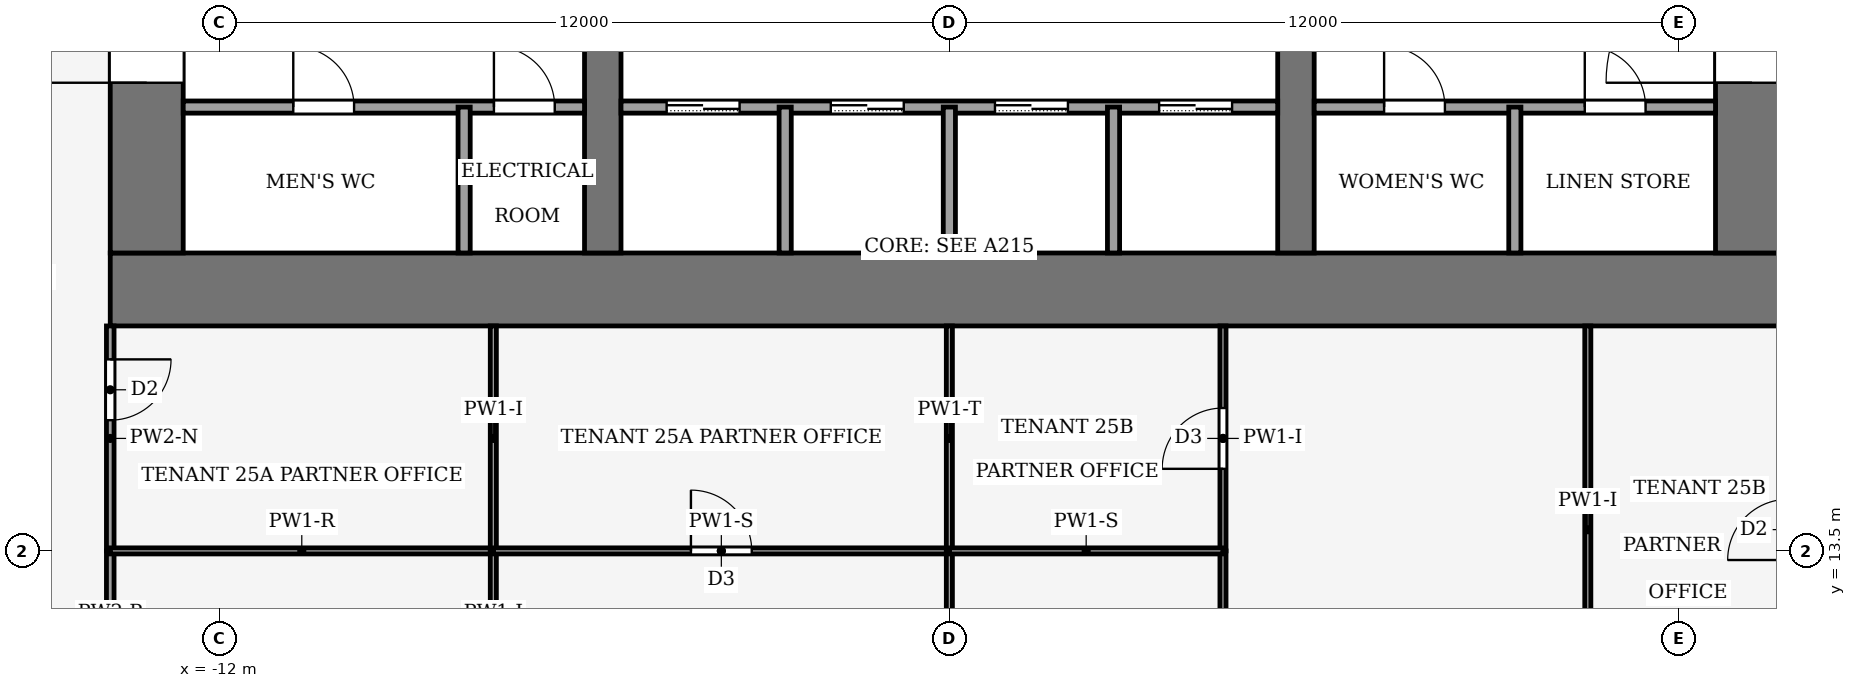
"""IFC4 building model, lengths in metres.
Left out: names, types, materials, properties, quantities, classifications, styles, units other than length and angle.
Written with IfcOpenShell. Run it as: python <this file> out.ifc"""

import sys

from ifc_helpers import new_model, si_unit, direction, frame, frame_2d, origin, place, context, subcontext, project, spatial, rectangle, extrude, element, fill, save


model = new_model("IFC4")
c1 = context("Model", 3, precision=1e-05, world=origin(), true_north=direction((0.0, 1.0)))
c2 = subcontext(c1, "Body", "Model", "MODEL_VIEW")
j1 = project(units=[si_unit("LENGTHUNIT", "METRE"), si_unit("PLANEANGLEUNIT", "RADIAN")], contexts=[c1])
p1 = place(None, origin())
s1 = spatial("IfcSite", under=j1, at=p1, CompositionType="ELEMENT")
p2 = place(p1, origin())
s2 = spatial("IfcBuilding", under=s1, at=p2, CompositionType="ELEMENT")
p3 = place(p2, frame((0.0, 0.0, 110.0)))
s3 = spatial("IfcBuildingStorey", under=s2, at=p3, CompositionType="ELEMENT", Elevation=110.0)
p4 = place(p3, frame((-13.8, 17.8, -0.13), z_axis=(0.0, 0.0, 1.0), x_axis=(1.0, 0.0, 0.0)))
e1 = element("IfcWall", 1, at=p4, inside=s3, PredefinedType="SHEAR", context=c2, shape_type="SweptSolid", body=[
    extrude(rectangle(XDim=27.6, YDim=1.2, at=frame_2d((13.8, 0.0))), origin(), (0.0, 0.0, 1.0), 3.88),
])
p5 = place(p3, frame((-13.2, 18.4, -0.13), z_axis=(0.0, 0.0, 1.0), x_axis=(0.0, 1.0, 0.0)))
e2 = element("IfcWall", 2, at=p5, inside=s3, PredefinedType="SHEAR", context=c2, shape_type="SweptSolid", body=[
    extrude(rectangle(XDim=19.2, YDim=1.2, at=frame_2d((9.6, 0.0))), origin(), (0.0, 0.0, 1.0), 3.88),
])
p6 = place(p5, frame((2.8, 0.0, 0.13)))
e3 = element("IfcOpeningElement", 3, at=p6, cuts=e2, PredefinedType="OPENING", context=c2, shape_type="SweptSolid", body=[
    extrude(rectangle(XDim=2.4, YDim=2.4, at=frame_2d((1.2, 1.2))), frame((0.0, 0.61, 0.0), z_axis=(0.0, -1.0, 0.0), x_axis=(1.0, 0.0, 0.0)), (0.0, 0.0, 1.0), 1.22),
])
p7 = place(p5, frame((13.4, 0.0, 0.13)))
e4 = element("IfcOpeningElement", 4, at=p7, cuts=e2, PredefinedType="OPENING", context=c2, shape_type="SweptSolid", body=[
    extrude(rectangle(XDim=1.4, YDim=2.2, at=frame_2d((0.7, 1.1))), frame((0.0, 0.61, 0.0), z_axis=(0.0, -1.0, 0.0), x_axis=(1.0, 0.0, 0.0)), (0.0, 0.0, 1.0), 1.22),
])
p8 = place(p3, frame((13.2, 18.4, -0.13), z_axis=(0.0, 0.0, 1.0), x_axis=(0.0, 1.0, 0.0)))
e5 = element("IfcWall", 5, at=p8, inside=s3, PredefinedType="SHEAR", context=c2, shape_type="SweptSolid", body=[
    extrude(rectangle(XDim=19.2, YDim=1.2, at=frame_2d((9.6, 0.0))), origin(), (0.0, 0.0, 1.0), 3.88),
])
p9 = place(p8, frame((2.8, 0.0, 0.13)))
e6 = element("IfcOpeningElement", 6, at=p9, cuts=e5, PredefinedType="OPENING", context=c2, shape_type="SweptSolid", body=[
    extrude(rectangle(XDim=2.4, YDim=2.4, at=frame_2d((1.2, 1.2))), frame((0.0, 0.61, 0.0), z_axis=(0.0, -1.0, 0.0), x_axis=(1.0, 0.0, 0.0)), (0.0, 0.0, 1.0), 1.22),
])
p10 = place(p8, frame((13.3, 0.0, 0.13)))
e7 = element("IfcOpeningElement", 7, at=p10, cuts=e5, PredefinedType="OPENING", context=c2, shape_type="SweptSolid", body=[
    extrude(rectangle(XDim=2.4, YDim=2.4, at=frame_2d((1.2, 1.2))), frame((0.0, 0.61, 0.0), z_axis=(0.0, -1.0, 0.0), x_axis=(1.0, 0.0, 0.0)), (0.0, 0.0, 1.0), 1.22),
])
p11 = place(p3, frame((-5.7, 18.4, -0.13), z_axis=(0.0, 0.0, 1.0), x_axis=(0.0, 1.0, 0.0)))
e8 = element("IfcWall", 8, at=p11, inside=s3, PredefinedType="SHEAR", context=c2, shape_type="SweptSolid", body=[
    extrude(rectangle(XDim=19.2, YDim=0.6, at=frame_2d((9.6, 0.0))), origin(), (0.0, 0.0, 1.0), 3.88),
])
p12 = place(p11, frame((8.35, 0.0, 0.13)))
e9 = element("IfcOpeningElement", 9, at=p12, cuts=e8, PredefinedType="OPENING", context=c2, shape_type="SweptSolid", body=[
    extrude(rectangle(XDim=0.9, YDim=2.1, at=frame_2d((0.45, 1.05))), frame((0.0, 0.31, 0.0), z_axis=(0.0, -1.0, 0.0), x_axis=(1.0, 0.0, 0.0)), (0.0, 0.0, 1.0), 0.62),
])
p13 = place(p3, frame((5.7, 18.4, -0.13), z_axis=(0.0, 0.0, 1.0), x_axis=(0.0, 1.0, 0.0)))
e10 = element("IfcWall", 10, at=p13, inside=s3, PredefinedType="SHEAR", context=c2, shape_type="SweptSolid", body=[
    extrude(rectangle(XDim=19.2, YDim=0.6, at=frame_2d((9.6, 0.0))), origin(), (0.0, 0.0, 1.0), 3.88),
])
p14 = place(p13, frame((8.35, 0.0, 0.13)))
e11 = element("IfcOpeningElement", 11, at=p14, cuts=e10, PredefinedType="OPENING", context=c2, shape_type="SweptSolid", body=[
    extrude(rectangle(XDim=0.9, YDim=2.1, at=frame_2d((0.45, 1.05))), frame((0.0, 0.31, 0.0), z_axis=(0.0, -1.0, 0.0), x_axis=(1.0, 0.0, 0.0)), (0.0, 0.0, 1.0), 0.62),
])
p15 = place(p13, frame((13.3, 0.0, 0.13)))
e12 = element("IfcOpeningElement", 12, at=p15, cuts=e10, PredefinedType="OPENING", context=c2, shape_type="SweptSolid", body=[
    extrude(rectangle(XDim=2.4, YDim=2.4, at=frame_2d((1.2, 1.2))), frame((0.0, 0.31, 0.0), z_axis=(0.0, -1.0, 0.0), x_axis=(1.0, 0.0, 0.0)), (0.0, 0.0, 1.0), 0.62),
])
p16 = place(p3, frame((-12.6, 20.8, 0.0), z_axis=(0.0, 0.0, 1.0), x_axis=(1.0, 0.0, 0.0)))
e13 = element("IfcWall", 13, at=p16, inside=s3, PredefinedType="PARTITIONING", context=c2, shape_type="SweptSolid", body=[
    extrude(rectangle(XDim=6.6, YDim=0.2, at=frame_2d((3.3, 0.0))), origin(), (0.0, 0.0, 1.0), 3.75),
])
p17 = place(p16, frame((1.81, 0.0, 0.0)))
e14 = element("IfcOpeningElement", 14, at=p17, cuts=e13, PredefinedType="OPENING", context=c2, shape_type="SweptSolid", body=[
    extrude(rectangle(XDim=1.0, YDim=2.1, at=frame_2d((0.5, 1.05))), frame((0.0, 0.11, 0.0), z_axis=(0.0, -1.0, 0.0), x_axis=(1.0, 0.0, 0.0)), (0.0, 0.0, 1.0), 0.22),
])
p18 = place(p16, frame((5.11, 0.0, 0.0)))
e15 = element("IfcOpeningElement", 15, at=p18, cuts=e13, PredefinedType="OPENING", context=c2, shape_type="SweptSolid", body=[
    extrude(rectangle(XDim=1.0, YDim=2.1, at=frame_2d((0.5, 1.05))), frame((0.0, 0.11, 0.0), z_axis=(0.0, -1.0, 0.0), x_axis=(1.0, 0.0, 0.0)), (0.0, 0.0, 1.0), 0.22),
])
p19 = place(p3, frame((-5.4, 20.8, 0.0), z_axis=(0.0, 0.0, 1.0), x_axis=(1.0, 0.0, 0.0)))
e16 = element("IfcWall", 16, at=p19, inside=s3, PredefinedType="PARTITIONING", context=c2, shape_type="SweptSolid", body=[
    extrude(rectangle(XDim=10.8, YDim=0.2, at=frame_2d((5.4, 0.0))), origin(), (0.0, 0.0, 1.0), 3.75),
])
p20 = place(p19, frame((0.75, 0.0, 0.0)))
e17 = element("IfcOpeningElement", 17, at=p20, cuts=e16, PredefinedType="OPENING", context=c2, shape_type="SweptSolid", body=[
    extrude(rectangle(XDim=1.2, YDim=2.2, at=frame_2d((0.6, 1.1))), frame((0.0, 0.11, 0.0), z_axis=(0.0, -1.0, 0.0), x_axis=(1.0, 0.0, 0.0)), (0.0, 0.0, 1.0), 0.22),
])
p21 = place(p19, frame((3.45, 0.0, 0.0)))
e18 = element("IfcOpeningElement", 18, at=p21, cuts=e16, PredefinedType="OPENING", context=c2, shape_type="SweptSolid", body=[
    extrude(rectangle(XDim=1.2, YDim=2.2, at=frame_2d((0.6, 1.1))), frame((0.0, 0.11, 0.0), z_axis=(0.0, -1.0, 0.0), x_axis=(1.0, 0.0, 0.0)), (0.0, 0.0, 1.0), 0.22),
])
p22 = place(p19, frame((6.15, 0.0, 0.0)))
e19 = element("IfcOpeningElement", 19, at=p22, cuts=e16, PredefinedType="OPENING", context=c2, shape_type="SweptSolid", body=[
    extrude(rectangle(XDim=1.2, YDim=2.2, at=frame_2d((0.6, 1.1))), frame((0.0, 0.11, 0.0), z_axis=(0.0, -1.0, 0.0), x_axis=(1.0, 0.0, 0.0)), (0.0, 0.0, 1.0), 0.22),
])
p23 = place(p19, frame((8.85, 0.0, 0.0)))
e20 = element("IfcOpeningElement", 20, at=p23, cuts=e16, PredefinedType="OPENING", context=c2, shape_type="SweptSolid", body=[
    extrude(rectangle(XDim=1.2, YDim=2.2, at=frame_2d((0.6, 1.1))), frame((0.0, 0.11, 0.0), z_axis=(0.0, -1.0, 0.0), x_axis=(1.0, 0.0, 0.0)), (0.0, 0.0, 1.0), 0.22),
])
p24 = place(p3, frame((6.0, 20.8, 0.0), z_axis=(0.0, 0.0, 1.0), x_axis=(1.0, 0.0, 0.0)))
e21 = element("IfcWall", 21, at=p24, inside=s3, PredefinedType="PARTITIONING", context=c2, shape_type="SweptSolid", body=[
    extrude(rectangle(XDim=6.6, YDim=0.2, at=frame_2d((3.3, 0.0))), origin(), (0.0, 0.0, 1.0), 3.75),
])
p25 = place(p24, frame((1.15, 0.0, 0.0)))
e22 = element("IfcOpeningElement", 22, at=p25, cuts=e21, PredefinedType="OPENING", context=c2, shape_type="SweptSolid", body=[
    extrude(rectangle(XDim=1.0, YDim=2.1, at=frame_2d((0.5, 1.05))), frame((0.0, 0.11, 0.0), z_axis=(0.0, -1.0, 0.0), x_axis=(1.0, 0.0, 0.0)), (0.0, 0.0, 1.0), 0.22),
])
p26 = place(p24, frame((4.45, 0.0, 0.0)))
e23 = element("IfcOpeningElement", 23, at=p26, cuts=e21, PredefinedType="OPENING", context=c2, shape_type="SweptSolid", body=[
    extrude(rectangle(XDim=1.0, YDim=2.1, at=frame_2d((0.5, 1.05))), frame((0.0, 0.11, 0.0), z_axis=(0.0, -1.0, 0.0), x_axis=(1.0, 0.0, 0.0)), (0.0, 0.0, 1.0), 0.22),
])
for number, where, z_axis, x_axis in (
    (24, (-7.98, 18.4, 0.0), (0.0, 0.0, 1.0), (0.0, 1.0, 0.0)),
    (25, (-2.7, 18.4, 0.0), (0.0, 0.0, 1.0), (0.0, 1.0, 0.0)),
    (26, (0.0, 18.4, 0.0), (0.0, 0.0, 1.0), (0.0, 1.0, 0.0)),
    (27, (2.7, 18.4, 0.0), (0.0, 0.0, 1.0), (0.0, 1.0, 0.0)),
    (28, (9.3, 18.4, 0.0), (0.0, 0.0, 1.0), (0.0, 1.0, 0.0)),
):
    element("IfcWall", number, at=place(p3, frame(where, z_axis=z_axis, x_axis=x_axis)), inside=s3, PredefinedType="PARTITIONING", context=c2, shape_type="SweptSolid", body=[
        extrude(rectangle(XDim=2.4, YDim=0.2, at=frame_2d((1.2, 0.0))), origin(), (0.0, 0.0, 1.0), 3.75),
    ])
p27 = place(p3, frame((-13.8, 10.5, 0.0), z_axis=(0.0, 0.0, 1.0), x_axis=(0.0, 1.0, 0.0)))
e29 = element("IfcWall", 29, at=p27, inside=s3, PredefinedType="PARTITIONING", context=c2, shape_type="SweptSolid", body=[
    extrude(rectangle(XDim=3.0, YDim=0.125, at=frame_2d((1.5, 0.0))), origin(), (0.0, 0.0, 1.0), 3.75),
])
p28 = place(p3, frame((-13.8, 17.2, 0.0), z_axis=(0.0, 0.0, 1.0), x_axis=(0.0, -1.0, 0.0)))
e30 = element("IfcWall", 30, at=p28, inside=s3, PredefinedType="PARTITIONING", context=c2, shape_type="SweptSolid", body=[
    extrude(rectangle(XDim=3.7, YDim=0.125, at=frame_2d((1.85, 0.0))), origin(), (0.0, 0.0, 1.0), 3.02),
])
p29 = place(p28, frame((0.55, 0.0, 0.0)))
e31 = element("IfcOpeningElement", 31, at=p29, cuts=e30, PredefinedType="OPENING", context=c2, shape_type="SweptSolid", body=[
    extrude(rectangle(XDim=1.0, YDim=2.1, at=frame_2d((0.5, 1.05))), frame((0.0, 0.073, 0.0), z_axis=(0.0, -1.0, 0.0), x_axis=(1.0, 0.0, 0.0)), (0.0, 0.0, 1.0), 0.145),
])
p30 = place(p3, frame((-7.5, 13.5, 0.0), z_axis=(0.0, 0.0, 1.0), x_axis=(-1.0, 0.0, 0.0)))
e32 = element("IfcWall", 32, at=p30, inside=s3, PredefinedType="PARTITIONING", context=c2, shape_type="SweptSolid", body=[
    extrude(rectangle(XDim=6.3, YDim=0.1, at=frame_2d((3.15, 0.0))), origin(), (0.0, 0.0, 1.0), 3.27),
])
p31 = place(p3, frame((-7.5, 10.496, 0.0), z_axis=(0.0, 0.0, 1.0), x_axis=(0.0, 1.0, 0.0)))
e33 = element("IfcWall", 33, at=p31, inside=s3, PredefinedType="PARTITIONING", context=c2, shape_type="SweptSolid", body=[
    extrude(rectangle(XDim=3.004, YDim=0.1, at=frame_2d((1.502, 0.0))), origin(), (0.0, 0.0, 1.0), 3.75),
])
p32 = place(p3, frame((-7.5, 13.5, 0.0), z_axis=(0.0, 0.0, 1.0), x_axis=(0.0, 1.0, 0.0)))
e34 = element("IfcWall", 34, at=p32, inside=s3, PredefinedType="PARTITIONING", context=c2, shape_type="SweptSolid", body=[
    extrude(rectangle(XDim=3.7, YDim=0.1, at=frame_2d((1.85, 0.0))), origin(), (0.0, 0.0, 1.0), 3.75),
])
p33 = place(p3, frame((-7.5, 13.5, 0.0), z_axis=(0.0, 0.0, 1.0), x_axis=(1.0, 0.0, 0.0)))
e35 = element("IfcWall", 35, at=p33, inside=s3, PredefinedType="PARTITIONING", context=c2, shape_type="SweptSolid", body=[
    extrude(rectangle(XDim=7.5, YDim=0.1, at=frame_2d((3.75, 0.0))), origin(), (0.0, 0.0, 1.0), 3.32),
])
p34 = place(p33, frame((3.25, 0.0, 0.0)))
e36 = element("IfcOpeningElement", 36, at=p34, cuts=e35, PredefinedType="OPENING", context=c2, shape_type="SweptSolid", body=[
    extrude(rectangle(XDim=1.0, YDim=2.1, at=frame_2d((0.5, 1.05))), frame((0.0, 0.06, 0.0), z_axis=(0.0, -1.0, 0.0), x_axis=(1.0, 0.0, 0.0)), (0.0, 0.0, 1.0), 0.12),
])
p35 = place(p3, frame((0.0, 5.92, 0.0), z_axis=(0.0, 0.0, 1.0), x_axis=(0.0, 1.0, 0.0)))
e37 = element("IfcWall", 37, at=p35, inside=s3, PredefinedType="PARTITIONING", context=c2, shape_type="SweptSolid", body=[
    extrude(rectangle(XDim=7.58, YDim=0.1, at=frame_2d((3.79, 0.0))), origin(), (0.0, 0.0, 1.0), 2.92),
])
p36 = place(p3, frame((0.0, 13.5, 0.0), z_axis=(0.0, 0.0, 1.0), x_axis=(0.0, 1.0, 0.0)))
e38 = element("IfcWall", 38, at=p36, inside=s3, PredefinedType="PARTITIONING", context=c2, shape_type="SweptSolid", body=[
    extrude(rectangle(XDim=3.7, YDim=0.1, at=frame_2d((1.85, 0.0))), origin(), (0.0, 0.0, 1.0), 3.36),
])
p37 = place(p3, frame((10.5, 17.2, 0.0), z_axis=(0.0, 0.0, 1.0), x_axis=(0.0, -1.0, 0.0)))
e39 = element("IfcWall", 39, at=p37, inside=s3, PredefinedType="PARTITIONING", context=c2, shape_type="SweptSolid", body=[
    extrude(rectangle(XDim=6.704, YDim=0.1, at=frame_2d((3.352, 0.0))), origin(), (0.0, 0.0, 1.0), 3.75),
])
p38 = place(p3, frame((4.5, 5.545, 0.0), z_axis=(0.0, 0.0, 1.0), x_axis=(0.0, 1.0, 0.0)))
e40 = element("IfcWall", 40, at=p38, inside=s3, PredefinedType="PARTITIONING", context=c2, shape_type="SweptSolid", body=[
    extrude(rectangle(XDim=7.955, YDim=0.1, at=frame_2d((3.978, 0.0))), origin(), (0.0, 0.0, 1.0), 2.92),
])
p39 = place(p38, frame((3.542, 0.0, 0.0)))
e41 = element("IfcOpeningElement", 41, at=p39, cuts=e40, PredefinedType="OPENING", context=c2, shape_type="SweptSolid", body=[
    extrude(rectangle(XDim=1.0, YDim=2.1, at=frame_2d((0.5, 1.05))), frame((0.0, 0.06, 0.0), z_axis=(0.0, -1.0, 0.0), x_axis=(1.0, 0.0, 0.0)), (0.0, 0.0, 1.0), 0.12),
])
p40 = place(p3, frame((4.5, 13.5, 0.0), z_axis=(0.0, 0.0, 1.0), x_axis=(0.0, 1.0, 0.0)))
e42 = element("IfcWall", 42, at=p40, inside=s3, PredefinedType="PARTITIONING", context=c2, shape_type="SweptSolid", body=[
    extrude(rectangle(XDim=3.7, YDim=0.1, at=frame_2d((1.85, 0.0))), origin(), (0.0, 0.0, 1.0), 3.75),
])
p41 = place(p40, frame((1.35, 0.0, 0.0)))
e43 = element("IfcOpeningElement", 43, at=p41, cuts=e42, PredefinedType="OPENING", context=c2, shape_type="SweptSolid", body=[
    extrude(rectangle(XDim=1.0, YDim=2.1, at=frame_2d((0.5, 1.05))), frame((0.0, 0.06, 0.0), z_axis=(0.0, -1.0, 0.0), x_axis=(1.0, 0.0, 0.0)), (0.0, 0.0, 1.0), 0.12),
])
p42 = place(p3, frame((4.5, 13.5, 0.0), z_axis=(0.0, 0.0, 1.0), x_axis=(-1.0, 0.0, 0.0)))
e44 = element("IfcWall", 44, at=p42, inside=s3, PredefinedType="PARTITIONING", context=c2, shape_type="SweptSolid", body=[
    extrude(rectangle(XDim=4.5, YDim=0.1, at=frame_2d((2.25, 0.0))), origin(), (0.0, 0.0, 1.0), 3.32),
])
p43 = place(p20, origin())
e45 = element("IfcDoor", 45, at=p43, inside=s3, OperationType="SLIDING_TO_LEFT", PredefinedType="DOOR", context=c2, shape_type="SweptSolid", body=[
    extrude(rectangle(XDim=1.2, YDim=2.2, at=frame_2d((0.6, 1.1))), frame((0.0, 0.025, 0.0), z_axis=(0.0, -1.0, 0.0), x_axis=(1.0, 0.0, 0.0)), (0.0, 0.0, 1.0), 0.05),
])
fill(e17, e45)
p44 = place(p21, origin())
e46 = element("IfcDoor", 46, at=p44, inside=s3, OperationType="SLIDING_TO_LEFT", PredefinedType="DOOR", context=c2, shape_type="SweptSolid", body=[
    extrude(rectangle(XDim=1.2, YDim=2.2, at=frame_2d((0.6, 1.1))), frame((0.0, 0.025, 0.0), z_axis=(0.0, -1.0, 0.0), x_axis=(1.0, 0.0, 0.0)), (0.0, 0.0, 1.0), 0.05),
])
fill(e18, e46)
p45 = place(p22, origin())
e47 = element("IfcDoor", 47, at=p45, inside=s3, OperationType="SLIDING_TO_LEFT", PredefinedType="DOOR", context=c2, shape_type="SweptSolid", body=[
    extrude(rectangle(XDim=1.2, YDim=2.2, at=frame_2d((0.6, 1.1))), frame((0.0, 0.025, 0.0), z_axis=(0.0, -1.0, 0.0), x_axis=(1.0, 0.0, 0.0)), (0.0, 0.0, 1.0), 0.05),
])
fill(e19, e47)
p46 = place(p23, origin())
e48 = element("IfcDoor", 48, at=p46, inside=s3, OperationType="SLIDING_TO_LEFT", PredefinedType="DOOR", context=c2, shape_type="SweptSolid", body=[
    extrude(rectangle(XDim=1.2, YDim=2.2, at=frame_2d((0.6, 1.1))), frame((0.0, 0.025, 0.0), z_axis=(0.0, -1.0, 0.0), x_axis=(1.0, 0.0, 0.0)), (0.0, 0.0, 1.0), 0.05),
])
fill(e20, e48)
p47 = place(p17, origin())
e49 = element("IfcDoor", 49, at=p47, inside=s3, OperationType="SINGLE_SWING_LEFT", PredefinedType="DOOR", context=c2, shape_type="SweptSolid", body=[
    extrude(rectangle(XDim=1.0, YDim=2.1, at=frame_2d((0.5, 1.05))), frame((0.0, 0.025, 0.0), z_axis=(0.0, -1.0, 0.0), x_axis=(1.0, 0.0, 0.0)), (0.0, 0.0, 1.0), 0.05),
])
fill(e14, e49)
p48 = place(p18, origin())
e50 = element("IfcDoor", 50, at=p48, inside=s3, OperationType="SINGLE_SWING_LEFT", PredefinedType="DOOR", context=c2, shape_type="SweptSolid", body=[
    extrude(rectangle(XDim=1.0, YDim=2.1, at=frame_2d((0.5, 1.05))), frame((0.0, 0.025, 0.0), z_axis=(0.0, -1.0, 0.0), x_axis=(1.0, 0.0, 0.0)), (0.0, 0.0, 1.0), 0.05),
])
fill(e15, e50)
p49 = place(p25, origin())
e51 = element("IfcDoor", 51, at=p49, inside=s3, OperationType="SINGLE_SWING_LEFT", PredefinedType="DOOR", context=c2, shape_type="SweptSolid", body=[
    extrude(rectangle(XDim=1.0, YDim=2.1, at=frame_2d((0.5, 1.05))), frame((0.0, 0.025, 0.0), z_axis=(0.0, -1.0, 0.0), x_axis=(1.0, 0.0, 0.0)), (0.0, 0.0, 1.0), 0.05),
])
fill(e22, e51)
p50 = place(p26, origin())
e52 = element("IfcDoor", 52, at=p50, inside=s3, OperationType="SINGLE_SWING_LEFT", PredefinedType="DOOR", context=c2, shape_type="SweptSolid", body=[
    extrude(rectangle(XDim=1.0, YDim=2.1, at=frame_2d((0.5, 1.05))), frame((0.0, 0.025, 0.0), z_axis=(0.0, -1.0, 0.0), x_axis=(1.0, 0.0, 0.0)), (0.0, 0.0, 1.0), 0.05),
])
fill(e23, e52)
p51 = place(p6, origin())
e53 = element("IfcDoor", 53, at=p51, inside=s3, OperationType="DOUBLE_DOOR_SINGLE_SWING", PredefinedType="DOOR", context=c2, shape_type="SweptSolid", body=[
    extrude(rectangle(XDim=2.4, YDim=2.4, at=frame_2d((1.2, 1.2))), frame((0.0, 0.025, 0.0), z_axis=(0.0, -1.0, 0.0), x_axis=(1.0, 0.0, 0.0)), (0.0, 0.0, 1.0), 0.05),
])
fill(e3, e53)
p52 = place(p9, origin())
e54 = element("IfcDoor", 54, at=p52, inside=s3, OperationType="DOUBLE_DOOR_SINGLE_SWING", PredefinedType="DOOR", context=c2, shape_type="SweptSolid", body=[
    extrude(rectangle(XDim=2.4, YDim=2.4, at=frame_2d((1.2, 1.2))), frame((0.0, 0.025, 0.0), z_axis=(0.0, -1.0, 0.0), x_axis=(1.0, 0.0, 0.0)), (0.0, 0.0, 1.0), 0.05),
])
fill(e6, e54)
p53 = place(p29, origin())
e55 = element("IfcDoor", 55, at=p53, inside=s3, OperationType="SINGLE_SWING_LEFT", PredefinedType="DOOR", context=c2, shape_type="SweptSolid", body=[
    extrude(rectangle(XDim=1.0, YDim=2.1, at=frame_2d((0.5, 1.05))), frame((0.0, 0.025, 0.0), z_axis=(0.0, -1.0, 0.0), x_axis=(1.0, 0.0, 0.0)), (0.0, 0.0, 1.0), 0.05),
])
fill(e31, e55)
p54 = place(p34, origin())
e56 = element("IfcDoor", 56, at=p54, inside=s3, OperationType="SINGLE_SWING_RIGHT", PredefinedType="DOOR", context=c2, shape_type="SweptSolid", body=[
    extrude(rectangle(XDim=1.0, YDim=2.1, at=frame_2d((0.5, 1.05))), frame((0.0, 0.025, 0.0), z_axis=(0.0, -1.0, 0.0), x_axis=(1.0, 0.0, 0.0)), (0.0, 0.0, 1.0), 0.05),
])
fill(e36, e56)
p55 = place(p41, origin())
e57 = element("IfcDoor", 57, at=p55, inside=s3, OperationType="SINGLE_SWING_LEFT", PredefinedType="DOOR", context=c2, shape_type="SweptSolid", body=[
    extrude(rectangle(XDim=1.0, YDim=2.1, at=frame_2d((0.5, 1.05))), frame((0.0, 0.025, 0.0), z_axis=(0.0, -1.0, 0.0), x_axis=(1.0, 0.0, 0.0)), (0.0, 0.0, 1.0), 0.05),
])
fill(e43, e57)
save(model, sys.argv[1])
